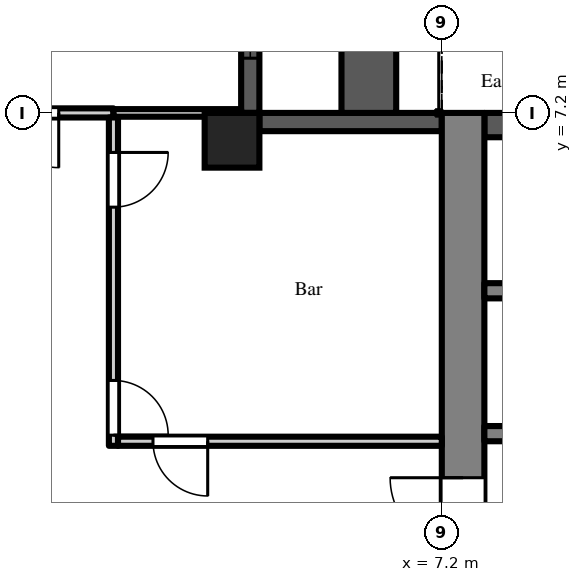
"""IFC4 building model, lengths in metres.
Left out: names, types, materials, properties, quantities, classifications, styles, units other than length and angle.
Written with IfcOpenShell. Run it as: python <this file> out.ifc"""

import sys

from ifc_helpers import new_model, si_unit, direction, frame, frame_2d, origin, origin_2d, place, context, subcontext, project, spatial, rectangle, extrude, element, fill, save


model = new_model("IFC4")
c1 = context("Model", 3, precision=1e-05, world=origin(), true_north=direction((0.0, 1.0)))
c2 = subcontext(c1, "Body", "Model", "MODEL_VIEW")
j1 = project(units=[si_unit("LENGTHUNIT", "METRE"), si_unit("PLANEANGLEUNIT", "RADIAN")], contexts=[c1])
p1 = place(None, origin())
s1 = spatial("IfcSite", under=j1, at=p1, CompositionType="ELEMENT")
p2 = place(p1, origin())
s2 = spatial("IfcBuilding", under=s1, at=p2, CompositionType="ELEMENT")
p3 = place(p2, frame((0.0, 0.0, 237.9)))
s3 = spatial("IfcBuildingStorey", under=s2, at=p3, CompositionType="ELEMENT", Elevation=237.9)
p4 = place(p3, frame((3.75, 6.75, 0.0), z_axis=(0.0, 0.0, 1.0), x_axis=(1.0, 0.0, 0.0)))
e1 = element("IfcColumn", 1, at=p4, inside=s3, PredefinedType="COLUMN", context=c2, shape_type="SweptSolid", body=[
    extrude(rectangle(XDim=0.9, YDim=0.9, at=origin_2d()), origin(), (0.0, 0.0, 1.0), 4.2),
])
p5 = place(p3, frame((7.2, 7.05, 0.0), z_axis=(0.0, 0.0, 1.0), x_axis=(-1.0, 0.0, 0.0)))
e2 = element("IfcWall", 2, at=p5, inside=s3, PredefinedType="SOLIDWALL", context=c2, shape_type="SweptSolid", body=[
    extrude(rectangle(XDim=3.0, YDim=0.3, at=frame_2d((1.5, 0.0))), origin(), (0.0, 0.0, 1.0), 3.75),
])
p6 = place(p3, frame((4.05, 7.2, 0.0), z_axis=(0.0, 0.0, 1.0), x_axis=(0.0, 1.0, 0.0)))
e3 = element("IfcWall", 3, at=p6, inside=s3, PredefinedType="SOLIDWALL", context=c2, shape_type="SweptSolid", body=[
    extrude(rectangle(XDim=7.2, YDim=0.3, at=frame_2d((3.6, 0.0))), origin(), (0.0, 0.0, 1.0), 3.75),
])
p7 = place(p6, frame((3.0, 0.0, 0.0)))
e4 = element("IfcOpeningElement", 4, at=p7, cuts=e3, PredefinedType="OPENING", context=c2, shape_type="SweptSolid", body=[
    extrude(rectangle(XDim=1.2, YDim=2.05, at=frame_2d((0.6, 1.025))), frame((0.0, 0.16, 0.0), z_axis=(0.0, -1.0, 0.0), x_axis=(1.0, 0.0, 0.0)), (0.0, 0.0, 1.0), 0.32),
])
p8 = place(p6, frame((0.9, 0.0, 0.2)))
e5 = element("IfcOpeningElement", 5, at=p8, cuts=e3, PredefinedType="OPENING", context=c2, shape_type="SweptSolid", body=[
    extrude(rectangle(XDim=1.8, YDim=1.85, at=frame_2d((0.9, 0.925))), frame((0.0, 0.16, 0.0), z_axis=(0.0, -1.0, 0.0), x_axis=(1.0, 0.0, 0.0)), (0.0, 0.0, 1.0), 0.32),
])
p9 = place(p6, frame((4.5, 0.0, 0.2)))
e6 = element("IfcOpeningElement", 6, at=p9, cuts=e3, PredefinedType="OPENING", context=c2, shape_type="SweptSolid", body=[
    extrude(rectangle(XDim=1.8, YDim=1.85, at=frame_2d((0.9, 0.925))), frame((0.0, 0.16, 0.0), z_axis=(0.0, -1.0, 0.0), x_axis=(1.0, 0.0, 0.0)), (0.0, 0.0, 1.0), 0.32),
])
p10 = place(p3, frame((6.0, 7.2, 0.0), z_axis=(0.0, 0.0, 1.0), x_axis=(0.0, 1.0, 0.0)))
e7 = element("IfcWall", 7, at=p10, inside=s3, PredefinedType="PARAPET", context=c2, shape_type="SweptSolid", body=[
    extrude(rectangle(XDim=7.2, YDim=0.9, at=frame_2d((3.6, 0.0))), origin(), (0.0, 0.0, 1.0), 0.8),
])
p11 = place(p3, frame((7.55, -7.2, 0.0), z_axis=(0.0, 0.0, 1.0), x_axis=(0.0, 1.0, 0.0)))
e8 = element("IfcWall", 8, at=p11, inside=s3, PredefinedType="SHEAR", context=c2, shape_type="SweptSolid", body=[
    extrude(rectangle(XDim=14.4, YDim=0.7, at=frame_2d((7.2, 0.0))), origin(), (0.0, 0.0, 1.0), 3.75),
])
p12 = place(p11, frame((6.0, 0.0, 0.0)))
e9 = element("IfcOpeningElement", 9, at=p12, cuts=e8, PredefinedType="OPENING", context=c2, shape_type="SweptSolid", body=[
    extrude(rectangle(XDim=2.4, YDim=2.2, at=frame_2d((1.2, 1.1))), frame((0.0, 0.36, 0.0), z_axis=(0.0, -1.0, 0.0), x_axis=(1.0, 0.0, 0.0)), (0.0, 0.0, 1.0), 0.72),
])
p13 = place(p3, frame((7.9, 7.0, 0.0), z_axis=(0.0, 0.0, 1.0), x_axis=(1.0, 0.0, 0.0)))
e10 = element("IfcWall", 10, at=p13, inside=s3, PredefinedType="SHEAR", context=c2, shape_type="SweptSolid", body=[
    extrude(rectangle(XDim=12.95, YDim=0.4, at=frame_2d((6.475, 0.0))), origin(), (0.0, 0.0, 1.0), 3.75),
])
p14 = place(p3, frame((7.9, 1.925, 0.0), z_axis=(0.0, 0.0, 1.0), x_axis=(1.0, 0.0, 0.0)))
e11 = element("IfcWall", 11, at=p14, inside=s3, PredefinedType="SHEAR", context=c2, shape_type="SweptSolid", body=[
    extrude(rectangle(XDim=12.95, YDim=0.25, at=frame_2d((6.475, 0.0))), origin(), (0.0, 0.0, 1.0), 3.75),
])
p15 = place(p14, frame((4.825, 0.0, 0.0)))
e12 = element("IfcOpeningElement", 12, at=p15, cuts=e11, PredefinedType="OPENING", context=c2, shape_type="SweptSolid", body=[
    extrude(rectangle(XDim=1.1, YDim=2.1, at=frame_2d((0.55, 1.05))), frame((0.0, 0.135, 0.0), z_axis=(0.0, -1.0, 0.0), x_axis=(1.0, 0.0, 0.0)), (0.0, 0.0, 1.0), 0.27),
])
p16 = place(p14, frame((7.025, 0.0, 0.0)))
e13 = element("IfcOpeningElement", 13, at=p16, cuts=e11, PredefinedType="OPENING", context=c2, shape_type="SweptSolid", body=[
    extrude(rectangle(XDim=1.1, YDim=2.1, at=frame_2d((0.55, 1.05))), frame((0.0, 0.135, 0.0), z_axis=(0.0, -1.0, 0.0), x_axis=(1.0, 0.0, 0.0)), (0.0, 0.0, 1.0), 0.27),
])
p17 = place(p14, frame((9.225, 0.0, 0.0)))
e14 = element("IfcOpeningElement", 14, at=p17, cuts=e11, PredefinedType="OPENING", context=c2, shape_type="SweptSolid", body=[
    extrude(rectangle(XDim=1.1, YDim=2.1, at=frame_2d((0.55, 1.05))), frame((0.0, 0.135, 0.0), z_axis=(0.0, -1.0, 0.0), x_axis=(1.0, 0.0, 0.0)), (0.0, 0.0, 1.0), 0.27),
])
p18 = place(p14, frame((0.525, 0.0, 0.0)))
e15 = element("IfcOpeningElement", 15, at=p18, cuts=e11, PredefinedType="OPENING", context=c2, shape_type="SweptSolid", body=[
    extrude(rectangle(XDim=0.9, YDim=2.1, at=frame_2d((0.45, 1.05))), frame((0.0, 0.135, 0.0), z_axis=(0.0, -1.0, 0.0), x_axis=(1.0, 0.0, 0.0)), (0.0, 0.0, 1.0), 0.27),
])
p19 = place(p14, frame((2.575, 0.0, 0.0)))
e16 = element("IfcOpeningElement", 16, at=p19, cuts=e11, PredefinedType="OPENING", context=c2, shape_type="SweptSolid", body=[
    extrude(rectangle(XDim=1.2, YDim=2.1, at=frame_2d((0.6, 1.05))), frame((0.0, 0.135, 0.0), z_axis=(0.0, -1.0, 0.0), x_axis=(1.0, 0.0, 0.0)), (0.0, 0.0, 1.0), 0.27),
])
p20 = place(p14, frame((11.525, 0.0, 0.0)))
e17 = element("IfcOpeningElement", 17, at=p20, cuts=e11, PredefinedType="OPENING", context=c2, shape_type="SweptSolid", body=[
    extrude(rectangle(XDim=0.9, YDim=2.1, at=frame_2d((0.45, 1.05))), frame((0.0, 0.135, 0.0), z_axis=(0.0, -1.0, 0.0), x_axis=(1.0, 0.0, 0.0)), (0.0, 0.0, 1.0), 0.27),
])
p21 = place(p3, frame((7.9, 4.275, 0.0), z_axis=(0.0, 0.0, 1.0), x_axis=(1.0, 0.0, 0.0)))
e18 = element("IfcWall", 18, at=p21, inside=s3, PredefinedType="SHEAR", context=c2, shape_type="SweptSolid", body=[
    extrude(rectangle(XDim=1.95, YDim=0.25, at=frame_2d((0.975, 0.0))), origin(), (0.0, 0.0, 1.0), 3.75),
])
p22 = place(p3, frame((-1.8, 7.2, 0.0), z_axis=(0.0, 0.0, 1.0), x_axis=(1.0, 0.0, 0.0)))
e19 = element("IfcWall", 19, at=p22, inside=s3, PredefinedType="PARTITIONING", context=c2, shape_type="SweptSolid", body=[
    extrude(rectangle(XDim=3.6, YDim=0.15, at=frame_2d((1.8, 0.0))), origin(), (0.0, 0.0, 1.0), 3.75),
])
p23 = place(p22, frame((0.9, 0.0, 0.0)))
e20 = element("IfcOpeningElement", 20, at=p23, cuts=e19, PredefinedType="OPENING", context=c2, shape_type="SweptSolid", body=[
    extrude(rectangle(XDim=1.8, YDim=2.1, at=frame_2d((0.9, 1.05))), frame((0.0, 0.085, 0.0), z_axis=(0.0, -1.0, 0.0), x_axis=(1.0, 0.0, 0.0)), (0.0, 0.0, 1.0), 0.17),
])
p24 = place(p3, frame((1.8, 1.725, 0.0), z_axis=(0.0, 0.0, 1.0), x_axis=(0.0, 1.0, 0.0)))
e21 = element("IfcWall", 21, at=p24, inside=s3, PredefinedType="PARTITIONING", context=c2, shape_type="SweptSolid", body=[
    extrude(rectangle(XDim=5.4, YDim=0.15, at=frame_2d((2.7, 0.0))), origin(), (0.0, 0.0, 1.0), 3.75),
])
p25 = place(p24, frame((0.175, 0.0, 0.0)))
e22 = element("IfcOpeningElement", 22, at=p25, cuts=e21, PredefinedType="OPENING", context=c2, shape_type="SweptSolid", body=[
    extrude(rectangle(XDim=0.9, YDim=2.1, at=frame_2d((0.45, 1.05))), frame((0.0, 0.085, 0.0), z_axis=(0.0, -1.0, 0.0), x_axis=(1.0, 0.0, 0.0)), (0.0, 0.0, 1.0), 0.17),
])
p26 = place(p24, frame((3.925, 0.0, 0.0)))
e23 = element("IfcOpeningElement", 23, at=p26, cuts=e21, PredefinedType="OPENING", context=c2, shape_type="SweptSolid", body=[
    extrude(rectangle(XDim=0.9, YDim=2.1, at=frame_2d((0.45, 1.05))), frame((0.0, 0.085, 0.0), z_axis=(0.0, -1.0, 0.0), x_axis=(1.0, 0.0, 0.0)), (0.0, 0.0, 1.0), 0.17),
])
p27 = place(p3, frame((1.875, 1.8, 0.0), z_axis=(0.0, 0.0, 1.0), x_axis=(1.0, 0.0, 0.0)))
e24 = element("IfcWall", 24, at=p27, inside=s3, PredefinedType="PARTITIONING", context=c2, shape_type="SweptSolid", body=[
    extrude(rectangle(XDim=5.325, YDim=0.15, at=frame_2d((2.663, 0.0))), origin(), (0.0, 0.0, 1.0), 3.75),
])
p28 = place(p27, frame((0.575, 0.0, 0.0)))
e25 = element("IfcOpeningElement", 25, at=p28, cuts=e24, PredefinedType="OPENING", context=c2, shape_type="SweptSolid", body=[
    extrude(rectangle(XDim=0.9, YDim=2.1, at=frame_2d((0.45, 1.05))), frame((0.0, 0.085, 0.0), z_axis=(0.0, -1.0, 0.0), x_axis=(1.0, 0.0, 0.0)), (0.0, 0.0, 1.0), 0.17),
])
p29 = place(p3, frame((1.8, 7.2, 0.0), z_axis=(0.0, 0.0, 1.0), x_axis=(1.0, 0.0, 0.0)))
e26 = element("IfcWall", 26, at=p29, inside=s3, PredefinedType="PARTITIONING", context=c2, shape_type="SweptSolid", body=[
    extrude(rectangle(XDim=2.1, YDim=0.125, at=frame_2d((1.05, 0.0))), origin(), (0.0, 0.0, 1.0), 3.75),
])
p30 = place(p8, origin())
e27 = element("IfcWindow", 27, at=p30, inside=s3, PartitioningType="SINGLE_PANEL", PredefinedType="WINDOW", context=c2, shape_type="SweptSolid", body=[
    extrude(rectangle(XDim=1.8, YDim=1.85, at=frame_2d((0.9, 0.925))), frame((0.0, 0.03, 0.0), z_axis=(0.0, -1.0, 0.0), x_axis=(1.0, 0.0, 0.0)), (0.0, 0.0, 1.0), 0.06),
])
fill(e5, e27)
p31 = place(p12, origin())
e28 = element("IfcDoor", 28, at=p31, inside=s3, OperationType="DOUBLE_DOOR_DOUBLE_SWING", PredefinedType="DOOR", context=c2, shape_type="SweptSolid", body=[
    extrude(rectangle(XDim=2.4, YDim=2.2, at=frame_2d((1.2, 1.1))), frame((0.0, 0.025, 0.0), z_axis=(0.0, -1.0, 0.0), x_axis=(1.0, 0.0, 0.0)), (0.0, 0.0, 1.0), 0.05),
])
fill(e9, e28)
p32 = place(p25, frame((0.9, 0.0, 0.0), z_axis=(0.0, 0.0, 1.0), x_axis=(-1.0, 0.0, 0.0)))
e29 = element("IfcDoor", 29, at=p32, inside=s3, OperationType="SINGLE_SWING_RIGHT", PredefinedType="DOOR", context=c2, shape_type="SweptSolid", body=[
    extrude(rectangle(XDim=0.9, YDim=2.1, at=frame_2d((0.45, 1.05))), frame((0.0, 0.025, 0.0), z_axis=(0.0, -1.0, 0.0), x_axis=(1.0, 0.0, 0.0)), (0.0, 0.0, 1.0), 0.05),
])
fill(e22, e29)
p33 = place(p26, frame((0.9, 0.0, 0.0), z_axis=(0.0, 0.0, 1.0), x_axis=(-1.0, 0.0, 0.0)))
e30 = element("IfcDoor", 30, at=p33, inside=s3, OperationType="SINGLE_SWING_LEFT", PredefinedType="DOOR", context=c2, shape_type="SweptSolid", body=[
    extrude(rectangle(XDim=0.9, YDim=2.1, at=frame_2d((0.45, 1.05))), frame((0.0, 0.025, 0.0), z_axis=(0.0, -1.0, 0.0), x_axis=(1.0, 0.0, 0.0)), (0.0, 0.0, 1.0), 0.05),
])
fill(e23, e30)
p34 = place(p28, frame((0.9, 0.0, 0.0), z_axis=(0.0, 0.0, 1.0), x_axis=(-1.0, 0.0, 0.0)))
e31 = element("IfcDoor", 31, at=p34, inside=s3, OperationType="SINGLE_SWING_LEFT", PredefinedType="DOOR", context=c2, shape_type="SweptSolid", body=[
    extrude(rectangle(XDim=0.9, YDim=2.1, at=frame_2d((0.45, 1.05))), frame((0.0, 0.025, 0.0), z_axis=(0.0, -1.0, 0.0), x_axis=(1.0, 0.0, 0.0)), (0.0, 0.0, 1.0), 0.05),
])
fill(e25, e31)
p35 = place(p23, frame((1.8, 0.0, 0.0), z_axis=(0.0, 0.0, 1.0), x_axis=(-1.0, 0.0, 0.0)))
e32 = element("IfcDoor", 32, at=p35, inside=s3, OperationType="DOUBLE_DOOR_DOUBLE_SWING", PredefinedType="DOOR", context=c2, shape_type="SweptSolid", body=[
    extrude(rectangle(XDim=1.8, YDim=2.1, at=frame_2d((0.9, 1.05))), frame((0.0, 0.025, 0.0), z_axis=(0.0, -1.0, 0.0), x_axis=(1.0, 0.0, 0.0)), (0.0, 0.0, 1.0), 0.05),
])
fill(e20, e32)
save(model, sys.argv[1])
